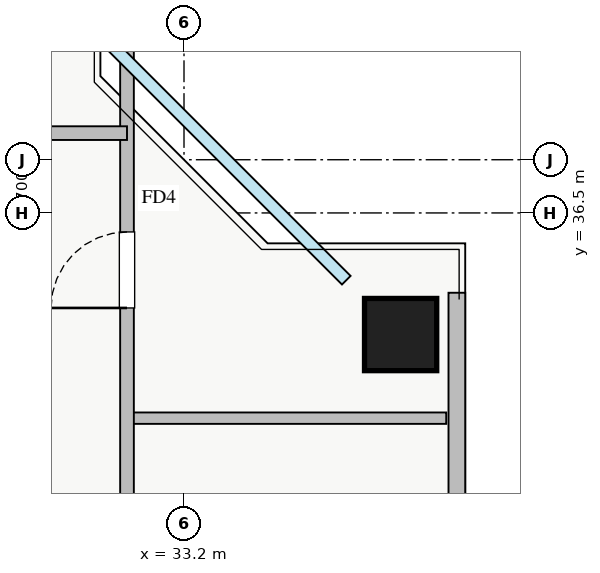
"""IFC4 building model, lengths in metres.
Left out: names, types, materials, properties, quantities, classifications, styles, units other than length and angle.
Written with IfcOpenShell. Run it as: python <this file> out.ifc"""

import sys

from ifc_helpers import new_model, si_unit, direction, frame, frame_2d, origin, origin_2d, place, context, subcontext, project, spatial, rectangle, extrude, source, transform, mapped, element, fill, save


model = new_model("IFC4")
c1 = context("Model", 3, precision=1e-05, world=origin(), true_north=direction((0.0, 1.0)))
c2 = subcontext(c1, "Body", "Model", "MODEL_VIEW")
j1 = project(units=[si_unit("LENGTHUNIT", "METRE"), si_unit("PLANEANGLEUNIT", "RADIAN")], contexts=[c1])
p1 = place(None, origin())
s1 = spatial("IfcSite", under=j1, at=p1, CompositionType="ELEMENT")
p2 = place(p1, origin())
s2 = spatial("IfcBuilding", under=s1, at=p2, CompositionType="ELEMENT")
p3 = place(p2, frame((0.0, 0.0, 166.5)))
s3 = spatial("IfcBuildingStorey", under=s2, at=p3, CompositionType="ELEMENT", Elevation=166.5)
m1 = source(origin(), c2, "Body", "SweptSolid", [
    extrude(rectangle(XDim=0.95, YDim=0.95, at=origin_2d()), origin(), (0.0, 0.0, 1.0), 3.25),
])
p4 = place(p3, frame((36.05, 34.9, 0.0), z_axis=(0.0, 0.0, 1.0), x_axis=(1.0, 0.0, 0.0)))
e1 = element("IfcColumn", 1, at=p4, inside=s3, PredefinedType="COLUMN", context=c2, shape_type="MappedRepresentation", body=[
    mapped(m1, transform((0.0, 0.0, 0.0), x_axis=(1.0, 0.0, 0.0), y_axis=(0.0, 1.0, 0.0), z_axis=(0.0, 0.0, 1.0), scale=1.0)),
])
p5 = place(p3, frame((36.79, 29.15, 0.0), z_axis=(0.0, 0.0, 1.0), x_axis=(0.0, 1.0, 0.0)))
e2 = element("IfcWall", 2, at=p5, inside=s3, PredefinedType="STANDARD", context=c2, shape_type="SweptSolid", body=[
    extrude(rectangle(XDim=6.3, YDim=0.22, at=frame_2d((3.15, 0.0))), origin(), (0.0, 0.0, 1.0), 2.61),
])
p6 = place(p3, frame((32.45, 33.8, 0.0), z_axis=(0.0, 0.0, 1.0), x_axis=(1.0, 0.0, 0.0)))
e3 = element("IfcWall", 3, at=p6, inside=s3, PredefinedType="PARTITIONING", context=c2, shape_type="SweptSolid", body=[
    extrude(rectangle(XDim=4.2, YDim=0.15, at=frame_2d((2.1, 0.0))), origin(), (0.0, 0.0, 1.0), 3.07),
])
p7 = place(p3, frame((32.45, 29.3, 0.0), z_axis=(0.0, 0.0, 1.0), x_axis=(0.0, 1.0, 0.0)))
e4 = element("IfcWall", 4, at=p7, inside=s3, PredefinedType="PARTITIONING", context=c2, shape_type="SweptSolid", body=[
    extrude(rectangle(XDim=11.35, YDim=0.18, at=frame_2d((5.675, 0.0))), origin(), (0.0, 0.0, 1.0), 3.07),
])
p8 = place(p7, frame((1.9, 0.0, 0.0)))
e5 = element("IfcOpeningElement", 5, at=p8, cuts=e4, PredefinedType="OPENING", context=c2, shape_type="SweptSolid", body=[
    extrude(rectangle(XDim=1.0, YDim=2.05, at=frame_2d((0.5, 1.025))), frame((0.0, 0.1, 0.0), z_axis=(0.0, -1.0, 0.0), x_axis=(1.0, 0.0, 0.0)), (0.0, 0.0, 1.0), 0.2),
])
p9 = place(p7, frame((5.95, 0.0, 0.0)))
e6 = element("IfcOpeningElement", 6, at=p9, cuts=e4, PredefinedType="OPENING", context=c2, shape_type="SweptSolid", body=[
    extrude(rectangle(XDim=1.0, YDim=2.05, at=frame_2d((0.5, 1.025))), frame((0.0, 0.1, 0.0), z_axis=(0.0, -1.0, 0.0), x_axis=(1.0, 0.0, 0.0)), (0.0, 0.0, 1.0), 0.2),
])
p10 = place(p3, frame((8.65, 37.55, 0.0), z_axis=(0.0, 0.0, 1.0), x_axis=(1.0, 0.0, 0.0)))
e7 = element("IfcWall", 7, at=p10, inside=s3, PredefinedType="PARTITIONING", context=c2, shape_type="SweptSolid", body=[
    extrude(rectangle(XDim=23.8, YDim=0.18, at=frame_2d((11.9, 0.0))), origin(), (0.0, 0.0, 1.0), 3.07),
])
p11 = place(p10, frame((2.425, 0.0, 0.0)))
e8 = element("IfcOpeningElement", 8, at=p11, cuts=e7, PredefinedType="OPENING", context=c2, shape_type="SweptSolid", body=[
    extrude(rectangle(XDim=1.0, YDim=2.05, at=frame_2d((0.5, 1.025))), frame((0.0, 0.1, 0.0), z_axis=(0.0, -1.0, 0.0), x_axis=(1.0, 0.0, 0.0)), (0.0, 0.0, 1.0), 0.2),
])
p12 = place(p10, frame((8.35, 0.0, 0.0)))
e9 = element("IfcOpeningElement", 9, at=p12, cuts=e7, PredefinedType="OPENING", context=c2, shape_type="SweptSolid", body=[
    extrude(rectangle(XDim=1.0, YDim=2.05, at=frame_2d((0.5, 1.025))), frame((0.0, 0.1, 0.0), z_axis=(0.0, -1.0, 0.0), x_axis=(1.0, 0.0, 0.0)), (0.0, 0.0, 1.0), 0.2),
])
p13 = place(p10, frame((14.35, 0.0, 0.0)))
e10 = element("IfcOpeningElement", 10, at=p13, cuts=e7, PredefinedType="OPENING", context=c2, shape_type="SweptSolid", body=[
    extrude(rectangle(XDim=1.0, YDim=2.05, at=frame_2d((0.5, 1.025))), frame((0.0, 0.1, 0.0), z_axis=(0.0, -1.0, 0.0), x_axis=(1.0, 0.0, 0.0)), (0.0, 0.0, 1.0), 0.2),
])
p14 = place(p10, frame((20.325, 0.0, 0.0)))
e11 = element("IfcOpeningElement", 11, at=p14, cuts=e7, PredefinedType="OPENING", context=c2, shape_type="SweptSolid", body=[
    extrude(rectangle(XDim=1.0, YDim=2.05, at=frame_2d((0.5, 1.025))), frame((0.0, 0.1, 0.0), z_axis=(0.0, -1.0, 0.0), x_axis=(1.0, 0.0, 0.0)), (0.0, 0.0, 1.0), 0.2),
])
m2 = source(origin(), c2, "Body", "SweptSolid", [
    extrude(rectangle(XDim=1.0, YDim=2.05, at=frame_2d((0.5, 1.025))), frame((0.0, 0.025, 0.0), z_axis=(0.0, -1.0, 0.0), x_axis=(1.0, 0.0, 0.0)), (0.0, 0.0, 1.0), 0.05),
])
p15 = place(p9, origin())
e12 = element("IfcDoor", 12, at=p15, inside=s3, OperationType="SINGLE_SWING_LEFT", PredefinedType="DOOR", context=c2, shape_type="MappedRepresentation", body=[
    mapped(m2, transform((0.0, 0.0, 0.0), x_axis=(1.0, 0.0, 0.0), y_axis=(0.0, 1.0, 0.0), z_axis=(0.0, 0.0, 1.0), scale=1.0)),
])
fill(e6, e12)
save(model, sys.argv[1])
